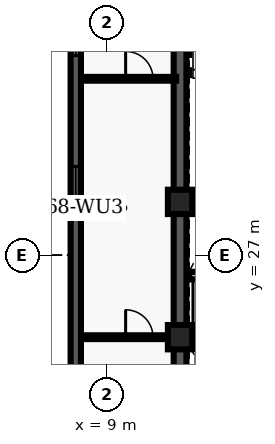
"""IFC4 building model, lengths in metres.
Left out: names, types, materials, properties, quantities, classifications, styles, units other than length and angle.
Written with IfcOpenShell. Run it as: python <this file> out.ifc"""

import sys

from ifc_helpers import new_model, entity, si_unit, converted_unit, direction, frame, origin_with_axes, origin_2d_with_axis, place, context, subcontext, project, spatial, polyline, rectangle, outline, extrude, element, fill, save


model = new_model("IFC4")
c1 = context("Model", 3, precision=1e-05, world=origin_with_axes(), true_north=direction((0.0, 1.0)))
c2 = subcontext(c1, "Body", "Model", "MODEL_VIEW")
j1 = project(units=[si_unit("LENGTHUNIT", "METRE"), converted_unit("PLANEANGLEUNIT", "DEGREE", entity("IfcPlaneAngleMeasure", 0.017), si_unit("PLANEANGLEUNIT", "RADIAN"), dimensions=[0, 0, 0, 0, 0, 0, 0])], contexts=[c1])
p1 = place(None, origin_with_axes())
s1 = spatial("IfcSite", under=j1, at=p1, CompositionType="ELEMENT")
p2 = place(p1, origin_with_axes())
s2 = spatial("IfcBuilding", under=s1, at=p2, CompositionType="ELEMENT")
p3 = place(p2, frame((0.0, 0.0, 276.3), z_axis=(0.0, 0.0, 1.0), x_axis=(1.0, 0.0, 0.0)))
s3 = spatial("IfcBuildingStorey", under=s2, at=p3, CompositionType="ELEMENT", Elevation=276.3)
p4 = place(p3, frame((11.4, 10.8, 0.0), z_axis=(0.0, 0.0, 1.0), x_axis=(0.0, 1.0, 0.0)))
e1 = element("IfcWall", 1, at=p4, inside=s3, PredefinedType="SHEAR", context=c2, shape_type="SweptSolid", body=[
    extrude(outline(polyline([(0.0, -0.21), (27.0, -0.21), (27.0, 0.21), (0.0, 0.21), (0.0, -0.21)])), origin_with_axes(), (0.0, 0.0, 1.0), 3.66),
])
p5 = place(p3, frame((11.61, 28.775, 0.0), z_axis=(0.0, 0.0, 1.0), x_axis=(1.0, 0.0, 0.0)))
e2 = element("IfcWall", 2, at=p5, inside=s3, PredefinedType="SHEAR", context=c2, shape_type="SweptSolid", body=[
    extrude(outline(polyline([(0.0, -0.125), (6.78, -0.125), (6.78, 0.125), (0.0, 0.125), (0.0, -0.125)])), origin_with_axes(), (0.0, 0.0, 1.0), 3.66),
])
p6 = place(p3, frame((11.7, 24.1, 0.0), z_axis=(0.0, 0.0, 1.0), x_axis=(1.0, 0.0, 0.0)))
e3 = element("IfcWall", 3, at=p6, inside=s3, PredefinedType="SOLIDWALL", context=c2, shape_type="SweptSolid", body=[
    extrude(outline(polyline([(0.0, -0.125), (6.6, -0.125), (6.6, 0.125), (0.0, 0.125), (0.0, -0.125)])), origin_with_axes(), (0.0, 0.0, 1.0), 2.7),
])
p7 = place(p6, frame((3.75, 0.0, 0.0), z_axis=(0.0, 0.0, 1.0), x_axis=(1.0, 0.0, 0.0)))
e4 = element("IfcOpeningElement", 4, at=p7, cuts=e3, PredefinedType="OPENING", context=c2, shape_type="SweptSolid", body=[
    extrude(rectangle(XDim=0.9, YDim=0.27, at=origin_2d_with_axis()), origin_with_axes(), (0.0, 0.0, 1.0), 2.15),
])
p8 = place(p3, frame((11.7, 26.325, 0.0), z_axis=(0.0, 0.0, 1.0), x_axis=(1.0, 0.0, 0.0)))
e5 = element("IfcWall", 5, at=p8, inside=s3, PredefinedType="SOLIDWALL", context=c2, shape_type="SweptSolid", body=[
    extrude(outline(polyline([(0.0, -0.125), (6.6, -0.125), (6.6, 0.125), (0.0, 0.125), (0.0, -0.125)])), origin_with_axes(), (0.0, 0.0, 1.0), 2.7),
])
p9 = place(p8, frame((3.5, 0.0, 0.0), z_axis=(0.0, 0.0, 1.0), x_axis=(1.0, 0.0, 0.0)))
e6 = element("IfcOpeningElement", 6, at=p9, cuts=e5, PredefinedType="OPENING", context=c2, shape_type="SweptSolid", body=[
    extrude(rectangle(XDim=0.9, YDim=0.27, at=origin_2d_with_axis()), origin_with_axes(), (0.0, 0.0, 1.0), 2.15),
])
for number, where, z_axis, x_axis in (
    (7, (11.4, 24.3, 0.0), (0.0, 0.0, 1.0), (1.0, 0.0, 0.0)),
    (8, (11.4, 28.75, 0.0), (0.0, 0.0, 1.0), (1.0, 0.0, 0.0)),
):
    element("IfcColumn", number, at=place(p3, frame(where, z_axis=z_axis, x_axis=x_axis)), inside=s3, PredefinedType="COLUMN", context=c2, shape_type="SweptSolid", body=[
        extrude(rectangle(XDim=0.8, YDim=0.8, at=origin_2d_with_axis()), origin_with_axes(), (0.0, 0.0, 1.0), 3.9),
    ])
p10 = place(p3, frame((8.135, 24.3, 0.0), z_axis=(0.0, 0.0, 1.0), x_axis=(1.0, 0.0, 0.0)))
e9 = element("IfcWall", 9, at=p10, inside=s3, PredefinedType="PARTITIONING", context=c2, shape_type="SweptSolid", body=[
    extrude(outline(polyline([(0.0, -0.062), (3.135, -0.062), (3.135, 0.062), (0.0, 0.062), (0.0, -0.062)])), origin_with_axes(), (0.0, 0.0, 1.0), 2.7),
])
p11 = place(p10, frame((1.925, 0.0, 0.0), z_axis=(0.0, 0.0, 1.0), x_axis=(1.0, 0.0, 0.0)))
e10 = element("IfcOpeningElement", 10, at=p11, cuts=e9, PredefinedType="OPENING", context=c2, shape_type="SweptSolid", body=[
    extrude(rectangle(XDim=0.9, YDim=0.145, at=origin_2d_with_axis()), origin_with_axes(), (0.0, 0.0, 1.0), 2.15),
])
p12 = place(p3, frame((8.135, 32.8, 0.0), z_axis=(0.0, 0.0, 1.0), x_axis=(1.0, 0.0, 0.0)))
e11 = element("IfcWall", 11, at=p12, inside=s3, PredefinedType="PARTITIONING", context=c2, shape_type="SweptSolid", body=[
    extrude(outline(polyline([(0.0, -0.062), (3.135, -0.062), (3.135, 0.062), (0.0, 0.062), (0.0, -0.062)])), origin_with_axes(), (0.0, 0.0, 1.0), 2.7),
])
p13 = place(p12, frame((1.925, 0.0, 0.0), z_axis=(0.0, 0.0, 1.0), x_axis=(1.0, 0.0, 0.0)))
e12 = element("IfcOpeningElement", 12, at=p13, cuts=e11, PredefinedType="OPENING", context=c2, shape_type="SweptSolid", body=[
    extrude(rectangle(XDim=0.9, YDim=0.145, at=origin_2d_with_axis()), origin_with_axes(), (0.0, 0.0, 1.0), 2.15),
])
p14 = place(p3, frame((7.97, 2.74, 0.0), z_axis=(0.0, 0.0, 1.0), x_axis=(0.0, 1.0, 0.0)))
e13 = element("IfcWall", 13, at=p14, inside=s3, PredefinedType="SOLIDWALL", context=c2, shape_type="SweptSolid", body=[
    extrude(outline(polyline([(0.0, -0.17), (43.46, -0.17), (43.46, 0.17), (0.0, 0.17), (0.0, -0.17)])), origin_with_axes(), (0.0, 0.0, 1.0), 3.66),
])
p15 = place(p14, frame((2.948, 0.0, 0.45), z_axis=(0.0, 0.0, 1.0), x_axis=(1.0, 0.0, 0.0)))
e14 = element("IfcOpeningElement", 14, at=p15, cuts=e13, PredefinedType="OPENING", context=c2, shape_type="SweptSolid", body=[
    extrude(rectangle(XDim=1.5, YDim=0.36, at=origin_2d_with_axis()), origin_with_axes(), (0.0, 0.0, 1.0), 2.1),
])
p16 = place(p14, frame((7.643, 0.0, 0.45), z_axis=(0.0, 0.0, 1.0), x_axis=(1.0, 0.0, 0.0)))
e15 = element("IfcOpeningElement", 15, at=p16, cuts=e13, PredefinedType="OPENING", context=c2, shape_type="SweptSolid", body=[
    extrude(rectangle(XDim=1.5, YDim=0.36, at=origin_2d_with_axis()), origin_with_axes(), (0.0, 0.0, 1.0), 2.1),
])
p17 = place(p14, frame((17.034, 0.0, 0.45), z_axis=(0.0, 0.0, 1.0), x_axis=(1.0, 0.0, 0.0)))
e16 = element("IfcOpeningElement", 16, at=p17, cuts=e13, PredefinedType="OPENING", context=c2, shape_type="SweptSolid", body=[
    extrude(rectangle(XDim=1.5, YDim=0.36, at=origin_2d_with_axis()), origin_with_axes(), (0.0, 0.0, 1.0), 2.1),
])
p18 = place(p14, frame((26.426, 0.0, 0.45), z_axis=(0.0, 0.0, 1.0), x_axis=(1.0, 0.0, 0.0)))
e17 = element("IfcOpeningElement", 17, at=p18, cuts=e13, PredefinedType="OPENING", context=c2, shape_type="SweptSolid", body=[
    extrude(rectangle(XDim=1.5, YDim=0.36, at=origin_2d_with_axis()), origin_with_axes(), (0.0, 0.0, 1.0), 2.1),
])
p19 = place(p14, frame((31.571, 0.0, 0.45), z_axis=(0.0, 0.0, 1.0), x_axis=(1.0, 0.0, 0.0)))
e18 = element("IfcOpeningElement", 18, at=p19, cuts=e13, PredefinedType="OPENING", context=c2, shape_type="SweptSolid", body=[
    extrude(rectangle(XDim=1.5, YDim=0.36, at=origin_2d_with_axis()), origin_with_axes(), (0.0, 0.0, 1.0), 2.1),
])
p20 = place(p14, frame((35.817, 0.0, 0.45), z_axis=(0.0, 0.0, 1.0), x_axis=(1.0, 0.0, 0.0)))
e19 = element("IfcOpeningElement", 19, at=p20, cuts=e13, PredefinedType="OPENING", context=c2, shape_type="SweptSolid", body=[
    extrude(rectangle(XDim=1.5, YDim=0.36, at=origin_2d_with_axis()), origin_with_axes(), (0.0, 0.0, 1.0), 2.1),
])
p21 = place(p14, frame((40.512, 0.0, 0.45), z_axis=(0.0, 0.0, 1.0), x_axis=(1.0, 0.0, 0.0)))
e20 = element("IfcOpeningElement", 20, at=p21, cuts=e13, PredefinedType="OPENING", context=c2, shape_type="SweptSolid", body=[
    extrude(rectangle(XDim=1.5, YDim=0.36, at=origin_2d_with_axis()), origin_with_axes(), (0.0, 0.0, 1.0), 2.1),
])
p22 = place(p10, frame((1.925, 0.0, 0.0), z_axis=(0.0, 0.0, 1.0), x_axis=(1.0, 0.0, 0.0)))
e21 = element("IfcDoor", 21, at=p22, inside=s3, OperationType="SINGLE_SWING_LEFT", PredefinedType="DOOR", context=c2, shape_type="SweptSolid", body=[
    extrude(rectangle(XDim=0.9, YDim=0.075, at=origin_2d_with_axis()), origin_with_axes(), (0.0, 0.0, 1.0), 2.15),
])
fill(e10, e21)
p23 = place(p12, frame((1.925, 0.0, 0.0), z_axis=(0.0, 0.0, 1.0), x_axis=(1.0, 0.0, 0.0)))
e22 = element("IfcDoor", 22, at=p23, inside=s3, OperationType="SINGLE_SWING_LEFT", PredefinedType="DOOR", context=c2, shape_type="SweptSolid", body=[
    extrude(rectangle(XDim=0.9, YDim=0.075, at=origin_2d_with_axis()), origin_with_axes(), (0.0, 0.0, 1.0), 2.15),
])
fill(e12, e22)
p24 = place(p14, frame((26.426, 0.0, 0.45), z_axis=(0.0, 0.0, 1.0), x_axis=(1.0, 0.0, 0.0)))
e23 = element("IfcWindow", 23, at=p24, inside=s3, PredefinedType="WINDOW", context=c2, shape_type="SweptSolid", body=[
    extrude(rectangle(XDim=1.5, YDim=0.09, at=origin_2d_with_axis()), origin_with_axes(), (0.0, 0.0, 1.0), 2.1),
])
fill(e17, e23)
p25 = place(p14, frame((31.571, 0.0, 0.45), z_axis=(0.0, 0.0, 1.0), x_axis=(1.0, 0.0, 0.0)))
e24 = element("IfcWindow", 24, at=p25, inside=s3, PredefinedType="WINDOW", context=c2, shape_type="SweptSolid", body=[
    extrude(rectangle(XDim=1.5, YDim=0.09, at=origin_2d_with_axis()), origin_with_axes(), (0.0, 0.0, 1.0), 2.1),
])
fill(e18, e24)
save(model, sys.argv[1])
